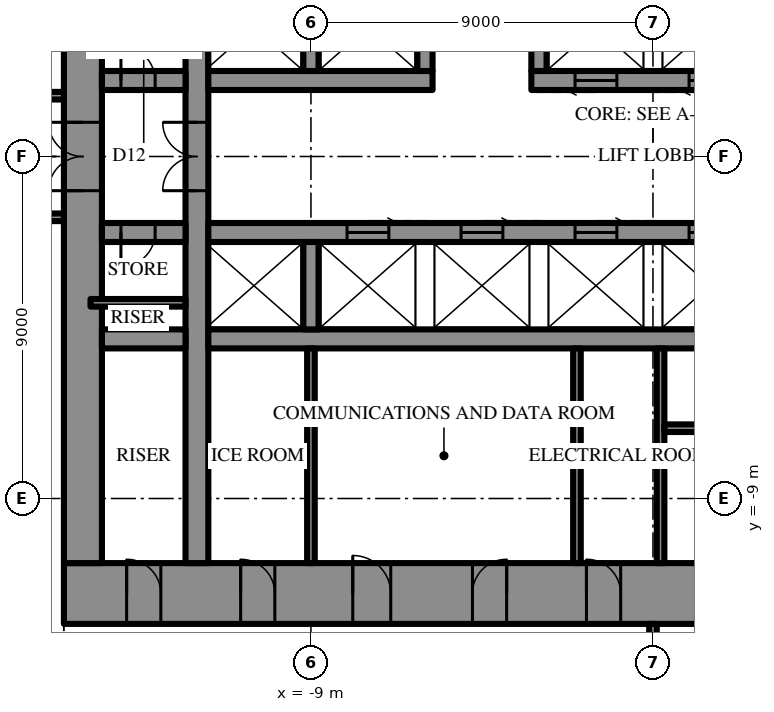
"""IFC4 building model, lengths in metres.
Left out: names, types, materials, properties, quantities, classifications, styles, units other than length and angle.
Written with IfcOpenShell. Run it as: python <this file> out.ifc"""

import sys

from ifc_helpers import new_model, si_unit, direction, frame, frame_2d, origin, place, context, subcontext, project, spatial, rectangle, extrude, element, fill, save


model = new_model("IFC4")
c1 = context("Model", 3, precision=1e-05, world=origin(), true_north=direction((0.0, 1.0)))
c2 = subcontext(c1, "Body", "Model", "MODEL_VIEW")
j1 = project(units=[si_unit("LENGTHUNIT", "METRE"), si_unit("PLANEANGLEUNIT", "RADIAN")], contexts=[c1])
p1 = place(None, origin())
s1 = spatial("IfcSite", under=j1, at=p1, CompositionType="ELEMENT")
p2 = place(p1, origin())
s2 = spatial("IfcBuilding", under=s1, at=p2, CompositionType="ELEMENT")
p3 = place(p2, frame((0.0, 0.0, 274.3)))
s3 = spatial("IfcBuildingStorey", under=s2, at=p3, CompositionType="ELEMENT", Elevation=274.3)
p4 = place(p3, frame((15.5, -11.5, 0.0), z_axis=(0.0, 0.0, 1.0), x_axis=(-1.0, 0.0, 0.0)))
e1 = element("IfcWall", 1, at=p4, inside=s3, PredefinedType="SHEAR", context=c2, shape_type="SweptSolid", body=[
    extrude(rectangle(XDim=31.0, YDim=1.6, at=frame_2d((15.5, 0.0))), origin(), (0.0, 0.0, 1.0), 4.2),
])
p5 = place(p4, frame((16.35, 0.0, 0.0)))
e2 = element("IfcOpeningElement", 2, at=p5, cuts=e1, PredefinedType="OPENING", context=c2, shape_type="SweptSolid", body=[
    extrude(rectangle(XDim=0.9, YDim=2.2, at=frame_2d((0.45, 1.1))), frame((0.0, 0.81, 0.0), z_axis=(0.0, -1.0, 0.0), x_axis=(1.0, 0.0, 0.0)), (0.0, 0.0, 1.0), 1.62),
])
p6 = place(p4, frame((19.35, 0.0, 0.0)))
e3 = element("IfcOpeningElement", 3, at=p6, cuts=e1, PredefinedType="OPENING", context=c2, shape_type="SweptSolid", body=[
    extrude(rectangle(XDim=0.9, YDim=2.2, at=frame_2d((0.45, 1.1))), frame((0.0, 0.81, 0.0), z_axis=(0.0, -1.0, 0.0), x_axis=(1.0, 0.0, 0.0)), (0.0, 0.0, 1.0), 1.62),
])
p7 = place(p4, frame((22.4, 0.0, 0.0)))
e4 = element("IfcOpeningElement", 4, at=p7, cuts=e1, PredefinedType="OPENING", context=c2, shape_type="SweptSolid", body=[
    extrude(rectangle(XDim=1.0, YDim=2.2, at=frame_2d((0.5, 1.1))), frame((0.0, 0.81, 0.0), z_axis=(0.0, -1.0, 0.0), x_axis=(1.0, 0.0, 0.0)), (0.0, 0.0, 1.0), 1.62),
])
p8 = place(p4, frame((1.65, 0.0, 0.0)))
e5 = element("IfcOpeningElement", 5, at=p8, cuts=e1, PredefinedType="OPENING", context=c2, shape_type="SweptSolid", body=[
    extrude(rectangle(XDim=0.9, YDim=2.2, at=frame_2d((0.45, 1.1))), frame((0.0, 0.81, 0.0), z_axis=(0.0, -1.0, 0.0), x_axis=(1.0, 0.0, 0.0)), (0.0, 0.0, 1.0), 1.62),
])
p9 = place(p4, frame((4.65, 0.0, 0.0)))
e6 = element("IfcOpeningElement", 6, at=p9, cuts=e1, PredefinedType="OPENING", context=c2, shape_type="SweptSolid", body=[
    extrude(rectangle(XDim=0.9, YDim=2.2, at=frame_2d((0.45, 1.1))), frame((0.0, 0.81, 0.0), z_axis=(0.0, -1.0, 0.0), x_axis=(1.0, 0.0, 0.0)), (0.0, 0.0, 1.0), 1.62),
])
p10 = place(p4, frame((25.45, 0.0, 0.0)))
e7 = element("IfcOpeningElement", 7, at=p10, cuts=e1, PredefinedType="OPENING", context=c2, shape_type="SweptSolid", body=[
    extrude(rectangle(XDim=0.9, YDim=2.2, at=frame_2d((0.45, 1.1))), frame((0.0, 0.81, 0.0), z_axis=(0.0, -1.0, 0.0), x_axis=(1.0, 0.0, 0.0)), (0.0, 0.0, 1.0), 1.62),
])
p11 = place(p4, frame((28.45, 0.0, 0.0)))
e8 = element("IfcOpeningElement", 8, at=p11, cuts=e1, PredefinedType="OPENING", context=c2, shape_type="SweptSolid", body=[
    extrude(rectangle(XDim=0.9, YDim=2.2, at=frame_2d((0.45, 1.1))), frame((0.0, 0.81, 0.0), z_axis=(0.0, -1.0, 0.0), x_axis=(1.0, 0.0, 0.0)), (0.0, 0.0, 1.0), 1.62),
])
p12 = place(p3, frame((-15.0, 10.7, 0.0), z_axis=(0.0, 0.0, 1.0), x_axis=(0.0, -1.0, 0.0)))
e9 = element("IfcWall", 9, at=p12, inside=s3, PredefinedType="SHEAR", context=c2, shape_type="SweptSolid", body=[
    extrude(rectangle(XDim=21.4, YDim=1.0, at=frame_2d((10.7, 0.0))), origin(), (0.0, 0.0, 1.0), 4.2),
])
p13 = place(p12, frame((9.8, 0.0, 0.0)))
e10 = element("IfcOpeningElement", 10, at=p13, cuts=e9, PredefinedType="OPENING", context=c2, shape_type="SweptSolid", body=[
    extrude(rectangle(XDim=1.8, YDim=2.4, at=frame_2d((0.9, 1.2))), frame((0.0, 0.51, 0.0), z_axis=(0.0, -1.0, 0.0), x_axis=(1.0, 0.0, 0.0)), (0.0, 0.0, 1.0), 1.02),
])
p14 = place(p3, frame((-12.0, -10.7, 0.0), z_axis=(0.0, 0.0, 1.0), x_axis=(0.0, 1.0, 0.0)))
e11 = element("IfcWall", 11, at=p14, inside=s3, PredefinedType="SHEAR", context=c2, shape_type="SweptSolid", body=[
    extrude(rectangle(XDim=21.4, YDim=0.6, at=frame_2d((10.7, 0.0))), origin(), (0.0, 0.0, 1.0), 4.2),
])
p15 = place(p14, frame((9.8, 0.0, 0.0)))
e12 = element("IfcOpeningElement", 12, at=p15, cuts=e11, PredefinedType="OPENING", context=c2, shape_type="SweptSolid", body=[
    extrude(rectangle(XDim=1.8, YDim=2.4, at=frame_2d((0.9, 1.2))), frame((0.0, 0.31, 0.0), z_axis=(0.0, -1.0, 0.0), x_axis=(1.0, 0.0, 0.0)), (0.0, 0.0, 1.0), 0.62),
])
p16 = place(p3, frame((-14.5, 2.0, 0.0), z_axis=(0.0, 0.0, 1.0), x_axis=(1.0, 0.0, 0.0)))
e13 = element("IfcWall", 13, at=p16, inside=s3, PredefinedType="SHEAR", context=c2, shape_type="SweptSolid", body=[
    extrude(rectangle(XDim=2.2, YDim=0.5, at=frame_2d((1.1, 0.0))), origin(), (0.0, 0.0, 1.0), 4.2),
])
p17 = place(p16, frame((0.5, 0.0, 0.0)))
e14 = element("IfcOpeningElement", 14, at=p17, cuts=e13, PredefinedType="OPENING", context=c2, shape_type="SweptSolid", body=[
    extrude(rectangle(XDim=0.9, YDim=2.2, at=frame_2d((0.45, 1.1))), frame((0.0, 0.26, 0.0), z_axis=(0.0, -1.0, 0.0), x_axis=(1.0, 0.0, 0.0)), (0.0, 0.0, 1.0), 0.52),
])
p18 = place(p3, frame((-11.7, 2.0, 0.0), z_axis=(0.0, 0.0, 1.0), x_axis=(1.0, 0.0, 0.0)))
e15 = element("IfcWall", 15, at=p18, inside=s3, PredefinedType="SHEAR", context=c2, shape_type="SweptSolid", body=[
    extrude(rectangle(XDim=5.9, YDim=0.5, at=frame_2d((2.95, 0.0))), origin(), (0.0, 0.0, 1.0), 4.2),
])
p19 = place(p3, frame((-3.2, 2.0, 0.0), z_axis=(0.0, 0.0, 1.0), x_axis=(1.0, 0.0, 0.0)))
e16 = element("IfcWall", 16, at=p19, inside=s3, PredefinedType="SHEAR", context=c2, shape_type="SweptSolid", body=[
    extrude(rectangle(XDim=14.9, YDim=0.5, at=frame_2d((7.45, 0.0))), origin(), (0.0, 0.0, 1.0), 4.2),
])
p20 = place(p19, frame((1.15, 0.0, 0.0)))
e17 = element("IfcOpeningElement", 17, at=p20, cuts=e16, PredefinedType="OPENING", context=c2, shape_type="SweptSolid", body=[
    extrude(rectangle(XDim=1.1, YDim=2.2, at=frame_2d((0.55, 1.1))), frame((0.0, 0.26, 0.0), z_axis=(0.0, -1.0, 0.0), x_axis=(1.0, 0.0, 0.0)), (0.0, 0.0, 1.0), 0.52),
])
p21 = place(p19, frame((4.15, 0.0, 0.0)))
e18 = element("IfcOpeningElement", 18, at=p21, cuts=e16, PredefinedType="OPENING", context=c2, shape_type="SweptSolid", body=[
    extrude(rectangle(XDim=1.1, YDim=2.2, at=frame_2d((0.55, 1.1))), frame((0.0, 0.26, 0.0), z_axis=(0.0, -1.0, 0.0), x_axis=(1.0, 0.0, 0.0)), (0.0, 0.0, 1.0), 0.52),
])
p22 = place(p19, frame((7.15, 0.0, 0.0)))
e19 = element("IfcOpeningElement", 19, at=p22, cuts=e16, PredefinedType="OPENING", context=c2, shape_type="SweptSolid", body=[
    extrude(rectangle(XDim=1.1, YDim=2.2, at=frame_2d((0.55, 1.1))), frame((0.0, 0.26, 0.0), z_axis=(0.0, -1.0, 0.0), x_axis=(1.0, 0.0, 0.0)), (0.0, 0.0, 1.0), 0.52),
])
p23 = place(p19, frame((10.15, 0.0, 0.0)))
e20 = element("IfcOpeningElement", 20, at=p23, cuts=e16, PredefinedType="OPENING", context=c2, shape_type="SweptSolid", body=[
    extrude(rectangle(XDim=1.1, YDim=2.2, at=frame_2d((0.55, 1.1))), frame((0.0, 0.26, 0.0), z_axis=(0.0, -1.0, 0.0), x_axis=(1.0, 0.0, 0.0)), (0.0, 0.0, 1.0), 0.52),
])
for number, where, z_axis, x_axis in (
    (21, (-9.0, 2.25, 0.0), (0.0, 0.0, 1.0), (0.0, 1.0, 0.0)),
    (22, (-6.0, 2.25, 0.0), (0.0, 0.0, 1.0), (0.0, 1.0, 0.0)),
    (23, (-3.0, 2.25, 0.0), (0.0, 0.0, 1.0), (0.0, 1.0, 0.0)),
):
    element("IfcWall", number, at=place(p3, frame(where, z_axis=z_axis, x_axis=x_axis)), inside=s3, PredefinedType="SHEAR", context=c2, shape_type="SweptSolid", body=[
        extrude(rectangle(XDim=2.3, YDim=0.4, at=frame_2d((1.15, 0.0))), origin(), (0.0, 0.0, 1.0), 4.2),
    ])
p24 = place(p3, frame((3.2, -2.0, 0.0), z_axis=(0.0, 0.0, 1.0), x_axis=(-1.0, 0.0, 0.0)))
e24 = element("IfcWall", 24, at=p24, inside=s3, PredefinedType="SHEAR", context=c2, shape_type="SweptSolid", body=[
    extrude(rectangle(XDim=14.9, YDim=0.5, at=frame_2d((7.45, 0.0))), origin(), (0.0, 0.0, 1.0), 4.2),
])
p25 = place(p24, frame((1.15, 0.0, 0.0)))
e25 = element("IfcOpeningElement", 25, at=p25, cuts=e24, PredefinedType="OPENING", context=c2, shape_type="SweptSolid", body=[
    extrude(rectangle(XDim=1.1, YDim=2.2, at=frame_2d((0.55, 1.1))), frame((0.0, 0.26, 0.0), z_axis=(0.0, -1.0, 0.0), x_axis=(1.0, 0.0, 0.0)), (0.0, 0.0, 1.0), 0.52),
])
p26 = place(p24, frame((4.15, 0.0, 0.0)))
e26 = element("IfcOpeningElement", 26, at=p26, cuts=e24, PredefinedType="OPENING", context=c2, shape_type="SweptSolid", body=[
    extrude(rectangle(XDim=1.1, YDim=2.2, at=frame_2d((0.55, 1.1))), frame((0.0, 0.26, 0.0), z_axis=(0.0, -1.0, 0.0), x_axis=(1.0, 0.0, 0.0)), (0.0, 0.0, 1.0), 0.52),
])
p27 = place(p24, frame((7.15, 0.0, 0.0)))
e27 = element("IfcOpeningElement", 27, at=p27, cuts=e24, PredefinedType="OPENING", context=c2, shape_type="SweptSolid", body=[
    extrude(rectangle(XDim=1.1, YDim=2.2, at=frame_2d((0.55, 1.1))), frame((0.0, 0.26, 0.0), z_axis=(0.0, -1.0, 0.0), x_axis=(1.0, 0.0, 0.0)), (0.0, 0.0, 1.0), 0.52),
])
p28 = place(p24, frame((10.15, 0.0, 0.0)))
e28 = element("IfcOpeningElement", 28, at=p28, cuts=e24, PredefinedType="OPENING", context=c2, shape_type="SweptSolid", body=[
    extrude(rectangle(XDim=1.1, YDim=2.2, at=frame_2d((0.55, 1.1))), frame((0.0, 0.26, 0.0), z_axis=(0.0, -1.0, 0.0), x_axis=(1.0, 0.0, 0.0)), (0.0, 0.0, 1.0), 0.52),
])
p29 = place(p3, frame((-12.3, -2.0, 0.0), z_axis=(0.0, 0.0, 1.0), x_axis=(-1.0, 0.0, 0.0)))
e29 = element("IfcWall", 29, at=p29, inside=s3, PredefinedType="SHEAR", context=c2, shape_type="SweptSolid", body=[
    extrude(rectangle(XDim=2.2, YDim=0.5, at=frame_2d((1.1, 0.0))), origin(), (0.0, 0.0, 1.0), 4.2),
])
p30 = place(p29, frame((0.8, 0.0, 0.0)))
e30 = element("IfcOpeningElement", 30, at=p30, cuts=e29, PredefinedType="OPENING", context=c2, shape_type="SweptSolid", body=[
    extrude(rectangle(XDim=0.9, YDim=2.2, at=frame_2d((0.45, 1.1))), frame((0.0, 0.26, 0.0), z_axis=(0.0, -1.0, 0.0), x_axis=(1.0, 0.0, 0.0)), (0.0, 0.0, 1.0), 0.52),
])
p31 = place(p3, frame((11.7, -4.8, 0.0), z_axis=(0.0, 0.0, 1.0), x_axis=(-1.0, 0.0, 0.0)))
e31 = element("IfcWall", 31, at=p31, inside=s3, PredefinedType="SHEAR", context=c2, shape_type="SweptSolid", body=[
    extrude(rectangle(XDim=23.4, YDim=0.5, at=frame_2d((11.7, 0.0))), origin(), (0.0, 0.0, 1.0), 4.2),
])
p32 = place(p31, frame((6.6, 0.0, 0.0)))
e32 = element("IfcOpeningElement", 32, at=p32, cuts=e31, PredefinedType="OPENING", context=c2, shape_type="SweptSolid", body=[
    extrude(rectangle(XDim=1.2, YDim=2.2, at=frame_2d((0.6, 1.1))), frame((0.0, 0.26, 0.0), z_axis=(0.0, -1.0, 0.0), x_axis=(1.0, 0.0, 0.0)), (0.0, 0.0, 1.0), 0.52),
])
p33 = place(p31, frame((3.6, 0.0, 0.0)))
e33 = element("IfcOpeningElement", 33, at=p33, cuts=e31, PredefinedType="OPENING", context=c2, shape_type="SweptSolid", body=[
    extrude(rectangle(XDim=1.2, YDim=2.2, at=frame_2d((0.6, 1.1))), frame((0.0, 0.26, 0.0), z_axis=(0.0, -1.0, 0.0), x_axis=(1.0, 0.0, 0.0)), (0.0, 0.0, 1.0), 0.52),
])
p34 = place(p3, frame((-12.3, -4.8, 0.0), z_axis=(0.0, 0.0, 1.0), x_axis=(-1.0, 0.0, 0.0)))
e34 = element("IfcWall", 34, at=p34, inside=s3, PredefinedType="SHEAR", context=c2, shape_type="SweptSolid", body=[
    extrude(rectangle(XDim=2.2, YDim=0.5, at=frame_2d((1.1, 0.0))), origin(), (0.0, 0.0, 1.0), 4.2),
])
p35 = place(p3, frame((-9.0, -2.25, 0.0), z_axis=(0.0, 0.0, 1.0), x_axis=(0.0, -1.0, 0.0)))
e35 = element("IfcWall", 35, at=p35, inside=s3, PredefinedType="SHEAR", context=c2, shape_type="SweptSolid", body=[
    extrude(rectangle(XDim=2.3, YDim=0.4, at=frame_2d((1.15, 0.0))), origin(), (0.0, 0.0, 1.0), 4.2),
])
p36 = place(p3, frame((0.2, -5.05, 0.0), z_axis=(0.0, 0.0, 1.0), x_axis=(0.0, -1.0, 0.0)))
e36 = element("IfcWall", 36, at=p36, inside=s3, PredefinedType="SHEAR", context=c2, shape_type="SweptSolid", body=[
    extrude(rectangle(XDim=5.65, YDim=0.2, at=frame_2d((2.825, 0.0))), origin(), (0.0, 0.0, 1.0), 4.2),
])
p37 = place(p3, frame((8.9, -7.15, 0.0), z_axis=(0.0, 0.0, 1.0), x_axis=(-1.0, 0.0, 0.0)))
e37 = element("IfcWall", 37, at=p37, inside=s3, PredefinedType="SHEAR", context=c2, shape_type="SweptSolid", body=[
    extrude(rectangle(XDim=8.6, YDim=0.2, at=frame_2d((4.3, 0.0))), origin(), (0.0, 0.0, 1.0), 4.2),
])
p38 = place(p37, frame((0.3, 0.0, 0.0)))
e38 = element("IfcOpeningElement", 38, at=p38, cuts=e37, PredefinedType="OPENING", context=c2, shape_type="SweptSolid", body=[
    extrude(rectangle(XDim=1.0, YDim=2.2, at=frame_2d((0.5, 1.1))), frame((0.0, 0.11, 0.0), z_axis=(0.0, -1.0, 0.0), x_axis=(1.0, 0.0, 0.0)), (0.0, 0.0, 1.0), 0.22),
])
for number, where, z_axis, x_axis in (
    (39, (-9.0, -5.05, 0.0), (0.0, 0.0, 1.0), (0.0, -1.0, 0.0)),
    (40, (-2.0, -5.05, 0.0), (0.0, 0.0, 1.0), (0.0, -1.0, 0.0)),
):
    element("IfcWall", number, at=place(p3, frame(where, z_axis=z_axis, x_axis=x_axis)), inside=s3, PredefinedType="PARTITIONING", context=c2, shape_type="SweptSolid", body=[
        extrude(rectangle(XDim=5.65, YDim=0.2, at=frame_2d((2.825, 0.0))), origin(), (0.0, 0.0, 1.0), 4.0),
    ])
p39 = place(p3, frame((-12.3, -3.85, 0.0), z_axis=(0.0, 0.0, 1.0), x_axis=(-1.0, 0.0, 0.0)))
e41 = element("IfcWall", 41, at=p39, inside=s3, PredefinedType="PARTITIONING", context=c2, shape_type="SweptSolid", body=[
    extrude(rectangle(XDim=2.5, YDim=0.2, at=frame_2d((1.25, 0.0))), origin(), (0.0, 0.0, 1.0), 4.0),
])
p40 = place(p3, frame((-15.5, 1.6, 0.0), z_axis=(0.0, 0.0, 1.0), x_axis=(-1.0, 0.0, 0.0)))
e42 = element("IfcWall", 42, at=p40, inside=s3, PredefinedType="PARTITIONING", context=c2, shape_type="SweptSolid", body=[
    extrude(rectangle(XDim=12.2, YDim=0.2, at=frame_2d((6.1, 0.0))), origin(), (0.0, 0.0, 1.0), 4.0),
])
p41 = place(p40, frame((8.04, 0.0, 0.0)))
e43 = element("IfcOpeningElement", 43, at=p41, cuts=e42, PredefinedType="OPENING", context=c2, shape_type="SweptSolid", body=[
    extrude(rectangle(XDim=1.0, YDim=2.2, at=frame_2d((0.5, 1.1))), frame((0.0, 0.11, 0.0), z_axis=(0.0, -1.0, 0.0), x_axis=(1.0, 0.0, 0.0)), (0.0, 0.0, 1.0), 0.22),
])
p42 = place(p3, frame((-15.5, -1.6, 0.0), z_axis=(0.0, 0.0, 1.0), x_axis=(-1.0, 0.0, 0.0)))
e44 = element("IfcWall", 44, at=p42, inside=s3, PredefinedType="PARTITIONING", context=c2, shape_type="SweptSolid", body=[
    extrude(rectangle(XDim=12.2, YDim=0.2, at=frame_2d((6.1, 0.0))), origin(), (0.0, 0.0, 1.0), 4.0),
])
p43 = place(p42, frame((8.04, 0.0, 0.0)))
e45 = element("IfcOpeningElement", 45, at=p43, cuts=e44, PredefinedType="OPENING", context=c2, shape_type="SweptSolid", body=[
    extrude(rectangle(XDim=1.0, YDim=2.2, at=frame_2d((0.5, 1.1))), frame((0.0, 0.11, 0.0), z_axis=(0.0, -1.0, 0.0), x_axis=(1.0, 0.0, 0.0)), (0.0, 0.0, 1.0), 0.22),
])
p44 = place(p3, frame((0.0, -12.3, 0.0), z_axis=(0.0, 0.0, 1.0), x_axis=(0.0, -1.0, 0.0)))
e46 = element("IfcWall", 46, at=p44, inside=s3, PredefinedType="PARTITIONING", context=c2, shape_type="SweptSolid", body=[
    extrude(rectangle(XDim=15.55, YDim=0.2, at=frame_2d((7.775, 0.0))), origin(), (0.0, 0.0, 1.0), 2.992),
])
p45 = place(p44, frame((1.055, 0.0, 0.0)))
e47 = element("IfcOpeningElement", 47, at=p45, cuts=e46, PredefinedType="OPENING", context=c2, shape_type="SweptSolid", body=[
    extrude(rectangle(XDim=1.0, YDim=2.2, at=frame_2d((0.5, 1.1))), frame((0.0, 0.11, 0.0), z_axis=(0.0, -1.0, 0.0), x_axis=(1.0, 0.0, 0.0)), (0.0, 0.0, 1.0), 0.22),
])
p46 = place(p13, frame((1.8, 0.0, 0.0), z_axis=(0.0, 0.0, 1.0), x_axis=(-1.0, 0.0, 0.0)))
e48 = element("IfcDoor", 48, at=p46, inside=s3, OperationType="DOUBLE_DOOR_SINGLE_SWING", PredefinedType="DOOR", context=c2, shape_type="SweptSolid", body=[
    extrude(rectangle(XDim=1.8, YDim=2.4, at=frame_2d((0.9, 1.2))), frame((0.0, 0.025, 0.0), z_axis=(0.0, -1.0, 0.0), x_axis=(1.0, 0.0, 0.0)), (0.0, 0.0, 1.0), 0.05),
])
fill(e10, e48)
p47 = place(p5, frame((0.9, 0.0, 0.0), z_axis=(0.0, 0.0, 1.0), x_axis=(-1.0, 0.0, 0.0)))
e49 = element("IfcDoor", 49, at=p47, inside=s3, OperationType="SINGLE_SWING_RIGHT", PredefinedType="DOOR", context=c2, shape_type="SweptSolid", body=[
    extrude(rectangle(XDim=0.9, YDim=2.2, at=frame_2d((0.45, 1.1))), frame((0.0, 0.025, 0.0), z_axis=(0.0, -1.0, 0.0), x_axis=(1.0, 0.0, 0.0)), (0.0, 0.0, 1.0), 0.05),
])
fill(e2, e49)
p48 = place(p6, frame((0.9, 0.0, 0.0), z_axis=(0.0, 0.0, 1.0), x_axis=(-1.0, 0.0, 0.0)))
e50 = element("IfcDoor", 50, at=p48, inside=s3, OperationType="SINGLE_SWING_LEFT", PredefinedType="DOOR", context=c2, shape_type="SweptSolid", body=[
    extrude(rectangle(XDim=0.9, YDim=2.2, at=frame_2d((0.45, 1.1))), frame((0.0, 0.025, 0.0), z_axis=(0.0, -1.0, 0.0), x_axis=(1.0, 0.0, 0.0)), (0.0, 0.0, 1.0), 0.05),
])
fill(e3, e50)
p49 = place(p7, frame((1.0, 0.0, 0.0), z_axis=(0.0, 0.0, 1.0), x_axis=(-1.0, 0.0, 0.0)))
e51 = element("IfcDoor", 51, at=p49, inside=s3, OperationType="SINGLE_SWING_RIGHT", PredefinedType="DOOR", context=c2, shape_type="SweptSolid", body=[
    extrude(rectangle(XDim=1.0, YDim=2.2, at=frame_2d((0.5, 1.1))), frame((0.0, 0.025, 0.0), z_axis=(0.0, -1.0, 0.0), x_axis=(1.0, 0.0, 0.0)), (0.0, 0.0, 1.0), 0.05),
])
fill(e4, e51)
p50 = place(p10, frame((0.9, 0.0, 0.0), z_axis=(0.0, 0.0, 1.0), x_axis=(-1.0, 0.0, 0.0)))
e52 = element("IfcDoor", 52, at=p50, inside=s3, OperationType="SINGLE_SWING_RIGHT", PredefinedType="DOOR", context=c2, shape_type="SweptSolid", body=[
    extrude(rectangle(XDim=0.9, YDim=2.2, at=frame_2d((0.45, 1.1))), frame((0.0, 0.025, 0.0), z_axis=(0.0, -1.0, 0.0), x_axis=(1.0, 0.0, 0.0)), (0.0, 0.0, 1.0), 0.05),
])
fill(e7, e52)
p51 = place(p11, frame((0.9, 0.0, 0.0), z_axis=(0.0, 0.0, 1.0), x_axis=(-1.0, 0.0, 0.0)))
e53 = element("IfcDoor", 53, at=p51, inside=s3, OperationType="SINGLE_SWING_RIGHT", PredefinedType="DOOR", context=c2, shape_type="SweptSolid", body=[
    extrude(rectangle(XDim=0.9, YDim=2.2, at=frame_2d((0.45, 1.1))), frame((0.0, 0.025, 0.0), z_axis=(0.0, -1.0, 0.0), x_axis=(1.0, 0.0, 0.0)), (0.0, 0.0, 1.0), 0.05),
])
fill(e8, e53)
p52 = place(p17, origin())
e54 = element("IfcDoor", 54, at=p52, inside=s3, OperationType="SINGLE_SWING_RIGHT", PredefinedType="DOOR", context=c2, shape_type="SweptSolid", body=[
    extrude(rectangle(XDim=0.9, YDim=2.2, at=frame_2d((0.45, 1.1))), frame((0.0, 0.025, 0.0), z_axis=(0.0, -1.0, 0.0), x_axis=(1.0, 0.0, 0.0)), (0.0, 0.0, 1.0), 0.05),
])
fill(e14, e54)
p53 = place(p30, origin())
e55 = element("IfcDoor", 55, at=p53, inside=s3, OperationType="SINGLE_SWING_LEFT", PredefinedType="DOOR", context=c2, shape_type="SweptSolid", body=[
    extrude(rectangle(XDim=0.9, YDim=2.2, at=frame_2d((0.45, 1.1))), frame((0.0, 0.025, 0.0), z_axis=(0.0, -1.0, 0.0), x_axis=(1.0, 0.0, 0.0)), (0.0, 0.0, 1.0), 0.05),
])
fill(e30, e55)
p54 = place(p15, origin())
e56 = element("IfcDoor", 56, at=p54, inside=s3, OperationType="DOUBLE_DOOR_SINGLE_SWING", PredefinedType="DOOR", context=c2, shape_type="SweptSolid", body=[
    extrude(rectangle(XDim=1.8, YDim=2.4, at=frame_2d((0.9, 1.2))), frame((0.0, 0.025, 0.0), z_axis=(0.0, -1.0, 0.0), x_axis=(1.0, 0.0, 0.0)), (0.0, 0.0, 1.0), 0.05),
])
fill(e12, e56)
p55 = place(p20, frame((1.1, 0.0, 0.0), z_axis=(0.0, 0.0, 1.0), x_axis=(-1.0, 0.0, 0.0)))
e57 = element("IfcDoor", 57, at=p55, inside=s3, OperationType="SLIDING_TO_LEFT", PredefinedType="DOOR", context=c2, shape_type="SweptSolid", body=[
    extrude(rectangle(XDim=1.1, YDim=2.2, at=frame_2d((0.55, 1.1))), frame((0.0, 0.025, 0.0), z_axis=(0.0, -1.0, 0.0), x_axis=(1.0, 0.0, 0.0)), (0.0, 0.0, 1.0), 0.05),
])
fill(e17, e57)
p56 = place(p21, frame((1.1, 0.0, 0.0), z_axis=(0.0, 0.0, 1.0), x_axis=(-1.0, 0.0, 0.0)))
e58 = element("IfcDoor", 58, at=p56, inside=s3, OperationType="SLIDING_TO_LEFT", PredefinedType="DOOR", context=c2, shape_type="SweptSolid", body=[
    extrude(rectangle(XDim=1.1, YDim=2.2, at=frame_2d((0.55, 1.1))), frame((0.0, 0.025, 0.0), z_axis=(0.0, -1.0, 0.0), x_axis=(1.0, 0.0, 0.0)), (0.0, 0.0, 1.0), 0.05),
])
fill(e18, e58)
p57 = place(p25, frame((1.1, 0.0, 0.0), z_axis=(0.0, 0.0, 1.0), x_axis=(-1.0, 0.0, 0.0)))
e59 = element("IfcDoor", 59, at=p57, inside=s3, OperationType="SLIDING_TO_LEFT", PredefinedType="DOOR", context=c2, shape_type="SweptSolid", body=[
    extrude(rectangle(XDim=1.1, YDim=2.2, at=frame_2d((0.55, 1.1))), frame((0.0, 0.025, 0.0), z_axis=(0.0, -1.0, 0.0), x_axis=(1.0, 0.0, 0.0)), (0.0, 0.0, 1.0), 0.05),
])
fill(e25, e59)
p58 = place(p26, frame((1.1, 0.0, 0.0), z_axis=(0.0, 0.0, 1.0), x_axis=(-1.0, 0.0, 0.0)))
e60 = element("IfcDoor", 60, at=p58, inside=s3, OperationType="SLIDING_TO_LEFT", PredefinedType="DOOR", context=c2, shape_type="SweptSolid", body=[
    extrude(rectangle(XDim=1.1, YDim=2.2, at=frame_2d((0.55, 1.1))), frame((0.0, 0.025, 0.0), z_axis=(0.0, -1.0, 0.0), x_axis=(1.0, 0.0, 0.0)), (0.0, 0.0, 1.0), 0.05),
])
fill(e26, e60)
p59 = place(p27, frame((1.1, 0.0, 0.0), z_axis=(0.0, 0.0, 1.0), x_axis=(-1.0, 0.0, 0.0)))
e61 = element("IfcDoor", 61, at=p59, inside=s3, OperationType="SLIDING_TO_LEFT", PredefinedType="DOOR", context=c2, shape_type="SweptSolid", body=[
    extrude(rectangle(XDim=1.1, YDim=2.2, at=frame_2d((0.55, 1.1))), frame((0.0, 0.025, 0.0), z_axis=(0.0, -1.0, 0.0), x_axis=(1.0, 0.0, 0.0)), (0.0, 0.0, 1.0), 0.05),
])
fill(e27, e61)
p60 = place(p28, frame((1.1, 0.0, 0.0), z_axis=(0.0, 0.0, 1.0), x_axis=(-1.0, 0.0, 0.0)))
e62 = element("IfcDoor", 62, at=p60, inside=s3, OperationType="SLIDING_TO_LEFT", PredefinedType="DOOR", context=c2, shape_type="SweptSolid", body=[
    extrude(rectangle(XDim=1.1, YDim=2.2, at=frame_2d((0.55, 1.1))), frame((0.0, 0.025, 0.0), z_axis=(0.0, -1.0, 0.0), x_axis=(1.0, 0.0, 0.0)), (0.0, 0.0, 1.0), 0.05),
])
fill(e28, e62)
save(model, sys.argv[1])
